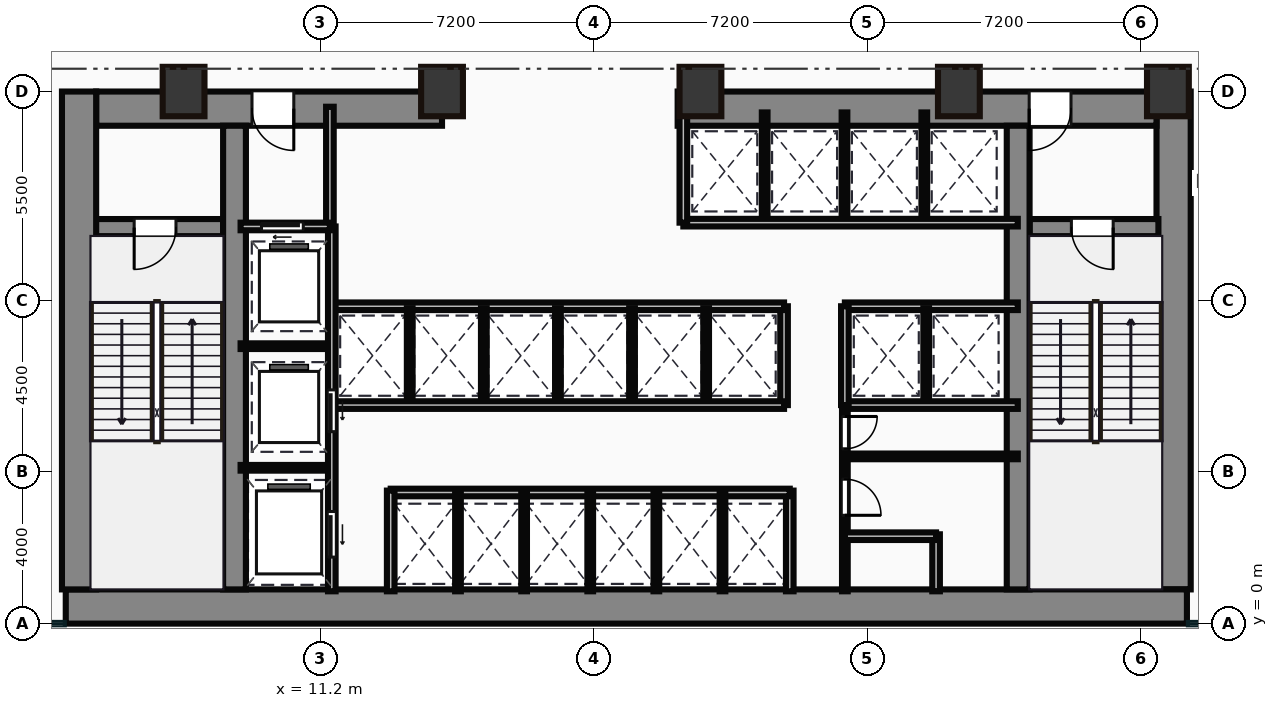
"""IFC4 building model, lengths in metres.
Left out: names, types, materials, properties, quantities, classifications, styles, units other than length and angle.
Written with IfcOpenShell. Run it as: python <this file> out.ifc"""

import sys

from ifc_helpers import new_model, si_unit, direction, frame, frame_2d, origin, origin_2d, place, context, subcontext, project, spatial, rectangle, hollow_rectangle, extrude, source, transform, mapped, element, fill, save


model = new_model("IFC4")
c1 = context("Model", 3, precision=1e-05, world=origin(), true_north=direction((0.0, 1.0)))
c2 = subcontext(c1, "Body", "Model", "MODEL_VIEW")
j1 = project(units=[si_unit("LENGTHUNIT", "METRE"), si_unit("PLANEANGLEUNIT", "RADIAN")], contexts=[c1])
p1 = place(None, origin())
s1 = spatial("IfcSite", under=j1, at=p1, CompositionType="ELEMENT")
p2 = place(p1, origin())
s2 = spatial("IfcBuilding", under=s1, at=p2, CompositionType="ELEMENT")
p3 = place(p2, frame((0.0, 0.0, 16.0)))
s3 = spatial("IfcBuildingStorey", under=s2, at=p3, CompositionType="ELEMENT", Elevation=16.0)
m1 = source(origin(), c2, "Body", "SweptSolid", [
    extrude(rectangle(XDim=29.5, YDim=0.9, at=frame_2d((14.75, 0.0))), origin(), (0.0, 0.0, 1.0), 5.0),
])
p4 = place(p3, frame((4.5, 0.45, 0.0), z_axis=(0.0, 0.0, 1.0), x_axis=(1.0, 0.0, 0.0)))
e1 = element("IfcWall", 1, at=p4, inside=s3, PredefinedType="SHEAR", context=c2, shape_type="MappedRepresentation", body=[
    mapped(m1, transform((0.0, 0.0, 0.0))),
])
m2 = source(origin(), c2, "Body", "SweptSolid", [
    extrude(rectangle(XDim=13.1, YDim=0.9, at=frame_2d((6.55, 0.0))), origin(), (0.0, 0.0, 1.0), 5.0),
])
for number, where, z_axis, x_axis in (
    (2, (4.85, 0.9, 0.0), (0.0, 0.0, 1.0), (0.0, 1.0, 0.0)),
    (3, (33.65, 0.9, 0.0), (0.0, 0.0, 1.0), (0.0, 1.0, 0.0)),
):
    element("IfcWall", number, at=place(p3, frame(where, z_axis=z_axis, x_axis=x_axis)), inside=s3, PredefinedType="SHEAR", context=c2, shape_type="MappedRepresentation", body=[
        mapped(m2, transform((0.0, 0.0, 0.0))),
    ])
m3 = source(origin(), c2, "Body", "SweptSolid", [
    extrude(rectangle(XDim=9.1, YDim=0.9, at=frame_2d((4.55, 0.0))), origin(), (0.0, 0.0, 1.0), 5.0),
])
p5 = place(p3, frame((5.3, 13.55, 0.0), z_axis=(0.0, 0.0, 1.0), x_axis=(1.0, 0.0, 0.0)))
e4 = element("IfcWall", 4, at=p5, inside=s3, PredefinedType="SHEAR", context=c2, shape_type="MappedRepresentation", body=[
    mapped(m3, transform((0.0, 0.0, 0.0))),
])
p6 = place(p5, frame((4.1, 0.0, 0.0)))
e5 = element("IfcOpeningElement", 5, at=p6, cuts=e4, PredefinedType="OPENING", context=c2, shape_type="SweptSolid", body=[
    extrude(rectangle(XDim=1.1, YDim=2.15, at=frame_2d((0.55, 1.075))), frame((0.0, 0.46, 0.0), z_axis=(0.0, -1.0, 0.0), x_axis=(1.0, 0.0, 0.0)), (0.0, 0.0, 1.0), 0.92),
])
m4 = source(origin(), c2, "Body", "SweptSolid", [
    extrude(rectangle(XDim=12.6, YDim=0.9, at=frame_2d((6.3, 0.0))), origin(), (0.0, 0.0, 1.0), 5.0),
])
p7 = place(p3, frame((20.6, 13.55, 0.0), z_axis=(0.0, 0.0, 1.0), x_axis=(1.0, 0.0, 0.0)))
e6 = element("IfcWall", 6, at=p7, inside=s3, PredefinedType="SHEAR", context=c2, shape_type="MappedRepresentation", body=[
    mapped(m4, transform((0.0, 0.0, 0.0))),
])
p8 = place(p7, frame((9.25, 0.0, 0.0)))
e7 = element("IfcOpeningElement", 7, at=p8, cuts=e6, PredefinedType="OPENING", context=c2, shape_type="SweptSolid", body=[
    extrude(rectangle(XDim=1.1, YDim=2.15, at=frame_2d((0.55, 1.075))), frame((0.0, 0.46, 0.0), z_axis=(0.0, -1.0, 0.0), x_axis=(1.0, 0.0, 0.0)), (0.0, 0.0, 1.0), 0.92),
])
m5 = source(origin(), c2, "Body", "SweptSolid", [
    extrude(rectangle(XDim=12.2, YDim=0.6, at=frame_2d((6.1, 0.0))), origin(), (0.0, 0.0, 1.0), 5.0),
])
for number, where, z_axis, x_axis in (
    (8, (8.94, 0.9, 0.0), (0.0, 0.0, 1.0), (0.0, 1.0, 0.0)),
    (9, (29.56, 0.9, 0.0), (0.0, 0.0, 1.0), (0.0, 1.0, 0.0)),
):
    element("IfcWall", number, at=place(p3, frame(where, z_axis=z_axis, x_axis=x_axis)), inside=s3, PredefinedType="SHEAR", context=c2, shape_type="MappedRepresentation", body=[
        mapped(m5, transform((0.0, 0.0, 0.0))),
    ])
m6 = source(origin(), c2, "Body", "SweptSolid", [
    extrude(rectangle(XDim=3.39, YDim=0.45, at=frame_2d((1.695, 0.0))), origin(), (0.0, 0.0, 1.0), 5.0),
])
p9 = place(p3, frame((5.25, 10.42, 0.0), z_axis=(0.0, 0.0, 1.0), x_axis=(1.0, 0.0, 0.0)))
e10 = element("IfcWall", 10, at=p9, inside=s3, PredefinedType="SHEAR", context=c2, shape_type="MappedRepresentation", body=[
    mapped(m6, transform((0.0, 0.0, 0.0))),
])
p10 = place(p9, frame((1.05, 0.0, 0.0)))
e11 = element("IfcOpeningElement", 11, at=p10, cuts=e10, PredefinedType="OPENING", context=c2, shape_type="SweptSolid", body=[
    extrude(rectangle(XDim=1.1, YDim=2.15, at=frame_2d((0.55, 1.075))), frame((0.0, 0.235, 0.0), z_axis=(0.0, -1.0, 0.0), x_axis=(1.0, 0.0, 0.0)), (0.0, 0.0, 1.0), 0.47),
])
p11 = place(p3, frame((29.86, 10.42, 0.0), z_axis=(0.0, 0.0, 1.0), x_axis=(1.0, 0.0, 0.0)))
e12 = element("IfcWall", 12, at=p11, inside=s3, PredefinedType="SHEAR", context=c2, shape_type="MappedRepresentation", body=[
    mapped(m6, transform((0.0, 0.0, 0.0))),
])
p12 = place(p11, frame((1.1, 0.0, 0.0)))
e13 = element("IfcOpeningElement", 13, at=p12, cuts=e12, PredefinedType="OPENING", context=c2, shape_type="SweptSolid", body=[
    extrude(rectangle(XDim=1.1, YDim=2.15, at=frame_2d((0.55, 1.075))), frame((0.0, 0.235, 0.0), z_axis=(0.0, -1.0, 0.0), x_axis=(1.0, 0.0, 0.0)), (0.0, 0.0, 1.0), 0.47),
])
m7 = source(origin(), c2, "Body", "SweptSolid", [
    extrude(hollow_rectangle(XDim=1.1, YDim=1.3, WallThickness=0.055, at=origin_2d()), origin(), (0.0, 0.0, 1.0), 5.0),
])
for number, where, z_axis, x_axis in (
    (14, (7.6, 14.0, 0.0), (0.0, 0.0, 1.0), (1.0, 0.0, 0.0)),
    (15, (14.4, 14.0, 0.0), (0.0, 0.0, 1.0), (1.0, 0.0, 0.0)),
    (16, (21.2, 14.0, 0.0), (0.0, 0.0, 1.0), (1.0, 0.0, 0.0)),
    (17, (28.0, 14.0, 0.0), (0.0, 0.0, 1.0), (1.0, 0.0, 0.0)),
    (18, (33.5, 14.0, 0.0), (0.0, 0.0, 1.0), (1.0, 0.0, 0.0)),
):
    element("IfcColumn", number, at=place(p3, frame(where, z_axis=z_axis, x_axis=x_axis)), inside=s3, PredefinedType="PILASTER", context=c2, shape_type="MappedRepresentation", body=[
        mapped(m7, transform((0.0, 0.0, 0.0))),
    ])
m8 = source(origin(), c2, "Body", "SweptSolid", [
    extrude(rectangle(XDim=3.18, YDim=0.2, at=frame_2d((1.59, 0.0))), origin(), (0.0, 0.0, 1.0), 4.7),
])
p13 = place(p3, frame((11.45, 10.42, 0.0), z_axis=(0.0, 0.0, 1.0), x_axis=(0.0, 1.0, 0.0)))
e19 = element("IfcWall", 19, at=p13, inside=s3, PredefinedType="PARTITIONING", context=c2, shape_type="MappedRepresentation", body=[
    mapped(m8, transform((0.0, 0.0, 0.0))),
])
m9 = source(origin(), c2, "Body", "SweptSolid", [
    extrude(rectangle(XDim=2.35, YDim=0.2, at=frame_2d((1.175, 0.0))), origin(), (0.0, 0.0, 1.0), 4.7),
])
p14 = place(p3, frame((9.1, 10.45, 0.0), z_axis=(0.0, 0.0, 1.0), x_axis=(1.0, 0.0, 0.0)))
e20 = element("IfcWall", 20, at=p14, inside=s3, PredefinedType="PARTITIONING", context=c2, shape_type="MappedRepresentation", body=[
    mapped(m9, transform((0.0, 0.0, 0.0))),
])
p15 = place(p14, frame((0.55, 0.0, 0.0)))
e21 = element("IfcOpeningElement", 21, at=p15, cuts=e20, PredefinedType="OPENING", context=c2, shape_type="SweptSolid", body=[
    extrude(rectangle(XDim=1.1, YDim=2.15, at=frame_2d((0.55, 1.075))), frame((0.0, 0.11, 0.0), z_axis=(0.0, -1.0, 0.0), x_axis=(1.0, 0.0, 0.0)), (0.0, 0.0, 1.0), 0.22),
])
m10 = source(origin(), c2, "Body", "SweptSolid", [
    extrude(rectangle(XDim=9.6, YDim=0.2, at=frame_2d((4.8, 0.0))), origin(), (0.0, 0.0, 1.0), 4.7),
])
p16 = place(p3, frame((11.5, 0.85, 0.0), z_axis=(0.0, 0.0, 1.0), x_axis=(0.0, 1.0, 0.0)))
e22 = element("IfcWall", 22, at=p16, inside=s3, PredefinedType="PARTITIONING", context=c2, shape_type="MappedRepresentation", body=[
    mapped(m10, transform((0.0, 0.0, 0.0))),
])
p17 = place(p16, frame((4.2, 0.0, 0.0)))
e23 = element("IfcOpeningElement", 23, at=p17, cuts=e22, PredefinedType="OPENING", context=c2, shape_type="SweptSolid", body=[
    extrude(rectangle(XDim=1.1, YDim=2.15, at=frame_2d((0.55, 1.075))), frame((0.0, 0.11, 0.0), z_axis=(0.0, -1.0, 0.0), x_axis=(1.0, 0.0, 0.0)), (0.0, 0.0, 1.0), 0.22),
])
p18 = place(p16, frame((0.9, 0.0, 0.0)))
e24 = element("IfcOpeningElement", 24, at=p18, cuts=e22, PredefinedType="OPENING", context=c2, shape_type="SweptSolid", body=[
    extrude(rectangle(XDim=1.2, YDim=2.15, at=frame_2d((0.6, 1.075))), frame((0.0, 0.11, 0.0), z_axis=(0.0, -1.0, 0.0), x_axis=(1.0, 0.0, 0.0)), (0.0, 0.0, 1.0), 0.22),
])
m11 = source(origin(), c2, "Body", "SweptSolid", [
    extrude(rectangle(XDim=2.4, YDim=0.15, at=frame_2d((1.2, 0.0))), origin(), (0.0, 0.0, 1.0), 4.7),
])
for number, where, z_axis, x_axis in (
    (25, (9.1, 4.1, 0.0), (0.0, 0.0, 1.0), (1.0, 0.0, 0.0)),
    (26, (9.1, 7.3, 0.0), (0.0, 0.0, 1.0), (1.0, 0.0, 0.0)),
):
    element("IfcWall", number, at=place(p3, frame(where, z_axis=z_axis, x_axis=x_axis)), inside=s3, PredefinedType="PARTITIONING", context=c2, shape_type="MappedRepresentation", body=[
        mapped(m11, transform((0.0, 0.0, 0.0))),
    ])
m12 = source(origin(), c2, "Body", "SweptSolid", [
    extrude(rectangle(XDim=2.65, YDim=0.2, at=frame_2d((1.325, 0.0))), origin(), (0.0, 0.0, 1.0), 4.7),
])
p19 = place(p3, frame((13.05, 0.85, 0.0), z_axis=(0.0, 0.0, 1.0), x_axis=(0.0, 1.0, 0.0)))
e27 = element("IfcWall", 27, at=p19, inside=s3, PredefinedType="PARTITIONING", context=c2, shape_type="MappedRepresentation", body=[
    mapped(m12, transform((0.0, 0.0, 0.0))),
])
m13 = source(origin(), c2, "Body", "SweptSolid", [
    extrude(rectangle(XDim=10.5, YDim=0.2, at=frame_2d((5.25, 0.0))), origin(), (0.0, 0.0, 1.0), 4.7),
])
p20 = place(p3, frame((13.05, 3.45, 0.0), z_axis=(0.0, 0.0, 1.0), x_axis=(1.0, 0.0, 0.0)))
e28 = element("IfcWall", 28, at=p20, inside=s3, PredefinedType="PARTITIONING", context=c2, shape_type="MappedRepresentation", body=[
    mapped(m13, transform((0.0, 0.0, 0.0))),
])
p21 = place(p3, frame((23.55, 0.85, 0.0), z_axis=(0.0, 0.0, 1.0), x_axis=(0.0, 1.0, 0.0)))
e29 = element("IfcWall", 29, at=p21, inside=s3, PredefinedType="PARTITIONING", context=c2, shape_type="MappedRepresentation", body=[
    mapped(m12, transform((0.0, 0.0, 0.0))),
])
m14 = source(origin(), c2, "Body", "SweptSolid", [
    extrude(rectangle(XDim=2.6, YDim=0.15, at=frame_2d((1.3, 0.0))), origin(), (0.0, 0.0, 1.0), 4.7),
])
for number, where, z_axis, x_axis in (
    (30, (14.82, 0.85, 0.0), (0.0, 0.0, 1.0), (0.0, 1.0, 0.0)),
    (31, (16.56, 0.85, 0.0), (0.0, 0.0, 1.0), (0.0, 1.0, 0.0)),
    (32, (18.3, 0.85, 0.0), (0.0, 0.0, 1.0), (0.0, 1.0, 0.0)),
    (33, (20.04, 0.85, 0.0), (0.0, 0.0, 1.0), (0.0, 1.0, 0.0)),
    (34, (21.78, 0.85, 0.0), (0.0, 0.0, 1.0), (0.0, 1.0, 0.0)),
):
    element("IfcWall", number, at=place(p3, frame(where, z_axis=z_axis, x_axis=x_axis)), inside=s3, PredefinedType="PARTITIONING", context=c2, shape_type="MappedRepresentation", body=[
        mapped(m14, transform((0.0, 0.0, 0.0))),
    ])
m15 = source(origin(), c2, "Body", "SweptSolid", [
    extrude(rectangle(XDim=11.85, YDim=0.2, at=frame_2d((5.925, 0.0))), origin(), (0.0, 0.0, 1.0), 4.7),
])
for number, where, z_axis, x_axis in (
    (35, (11.55, 5.75, 0.0), (0.0, 0.0, 1.0), (1.0, 0.0, 0.0)),
    (36, (11.55, 8.35, 0.0), (0.0, 0.0, 1.0), (1.0, 0.0, 0.0)),
):
    element("IfcWall", number, at=place(p3, frame(where, z_axis=z_axis, x_axis=x_axis)), inside=s3, PredefinedType="PARTITIONING", context=c2, shape_type="MappedRepresentation", body=[
        mapped(m15, transform((0.0, 0.0, 0.0))),
    ])
m16 = source(origin(), c2, "Body", "SweptSolid", [
    extrude(rectangle(XDim=2.6, YDim=0.2, at=frame_2d((1.3, 0.0))), origin(), (0.0, 0.0, 1.0), 4.7),
])
p22 = place(p3, frame((23.4, 5.75, 0.0), z_axis=(0.0, 0.0, 1.0), x_axis=(0.0, 1.0, 0.0)))
e37 = element("IfcWall", 37, at=p22, inside=s3, PredefinedType="PARTITIONING", context=c2, shape_type="MappedRepresentation", body=[
    mapped(m16, transform((0.0, 0.0, 0.0))),
])
m17 = source(origin(), c2, "Body", "SweptSolid", [
    extrude(rectangle(XDim=2.5, YDim=0.15, at=frame_2d((1.25, 0.0))), origin(), (0.0, 0.0, 1.0), 4.7),
])
for number, where, z_axis, x_axis in (
    (38, (13.55, 5.8, 0.0), (0.0, 0.0, 1.0), (0.0, 1.0, 0.0)),
    (39, (15.5, 5.8, 0.0), (0.0, 0.0, 1.0), (0.0, 1.0, 0.0)),
    (40, (17.45, 5.8, 0.0), (0.0, 0.0, 1.0), (0.0, 1.0, 0.0)),
    (41, (19.4, 5.8, 0.0), (0.0, 0.0, 1.0), (0.0, 1.0, 0.0)),
    (42, (21.35, 5.8, 0.0), (0.0, 0.0, 1.0), (0.0, 1.0, 0.0)),
):
    element("IfcWall", number, at=place(p3, frame(where, z_axis=z_axis, x_axis=x_axis)), inside=s3, PredefinedType="PARTITIONING", context=c2, shape_type="MappedRepresentation", body=[
        mapped(m17, transform((0.0, 0.0, 0.0))),
    ])
m18 = source(origin(), c2, "Body", "SweptSolid", [
    extrude(rectangle(XDim=8.8, YDim=0.2, at=frame_2d((4.4, 0.0))), origin(), (0.0, 0.0, 1.0), 4.7),
])
p23 = place(p3, frame((20.75, 10.55, 0.0), z_axis=(0.0, 0.0, 1.0), x_axis=(1.0, 0.0, 0.0)))
e43 = element("IfcWall", 43, at=p23, inside=s3, PredefinedType="PARTITIONING", context=c2, shape_type="MappedRepresentation", body=[
    mapped(m18, transform((0.0, 0.0, 0.0))),
])
m19 = source(origin(), c2, "Body", "SweptSolid", [
    extrude(rectangle(XDim=3.0, YDim=0.2, at=frame_2d((1.5, 0.0))), origin(), (0.0, 0.0, 1.0), 4.7),
])
p24 = place(p3, frame((20.75, 10.55, 0.0), z_axis=(0.0, 0.0, 1.0), x_axis=(0.0, 1.0, 0.0)))
e44 = element("IfcWall", 44, at=p24, inside=s3, PredefinedType="PARTITIONING", context=c2, shape_type="MappedRepresentation", body=[
    mapped(m19, transform((0.0, 0.0, 0.0))),
])
m20 = source(origin(), c2, "Body", "SweptSolid", [
    extrude(rectangle(XDim=2.85, YDim=0.15, at=frame_2d((1.425, 0.0))), origin(), (0.0, 0.0, 1.0), 4.7),
])
for number, where, z_axis, x_axis in (
    (45, (22.89, 10.6, 0.0), (0.0, 0.0, 1.0), (0.0, 1.0, 0.0)),
    (46, (24.99, 10.6, 0.0), (0.0, 0.0, 1.0), (0.0, 1.0, 0.0)),
    (47, (27.09, 10.6, 0.0), (0.0, 0.0, 1.0), (0.0, 1.0, 0.0)),
):
    element("IfcWall", number, at=place(p3, frame(where, z_axis=z_axis, x_axis=x_axis)), inside=s3, PredefinedType="PARTITIONING", context=c2, shape_type="MappedRepresentation", body=[
        mapped(m20, transform((0.0, 0.0, 0.0))),
    ])
m21 = source(origin(), c2, "Body", "SweptSolid", [
    extrude(rectangle(XDim=4.55, YDim=0.2, at=frame_2d((2.275, 0.0))), origin(), (0.0, 0.0, 1.0), 4.7),
])
for number, where, z_axis, x_axis in (
    (48, (25.0, 8.35, 0.0), (0.0, 0.0, 1.0), (1.0, 0.0, 0.0)),
    (49, (25.0, 5.75, 0.0), (0.0, 0.0, 1.0), (1.0, 0.0, 0.0)),
):
    element("IfcWall", number, at=place(p3, frame(where, z_axis=z_axis, x_axis=x_axis)), inside=s3, PredefinedType="PARTITIONING", context=c2, shape_type="MappedRepresentation", body=[
        mapped(m21, transform((0.0, 0.0, 0.0))),
    ])
p25 = place(p3, frame((25.0, 5.75, 0.0), z_axis=(0.0, 0.0, 1.0), x_axis=(0.0, 1.0, 0.0)))
e50 = element("IfcWall", 50, at=p25, inside=s3, PredefinedType="PARTITIONING", context=c2, shape_type="MappedRepresentation", body=[
    mapped(m16, transform((0.0, 0.0, 0.0))),
])
p26 = place(p3, frame((27.14, 5.8, 0.0), z_axis=(0.0, 0.0, 1.0), x_axis=(0.0, 1.0, 0.0)))
e51 = element("IfcWall", 51, at=p26, inside=s3, PredefinedType="PARTITIONING", context=c2, shape_type="MappedRepresentation", body=[
    mapped(m17, transform((0.0, 0.0, 0.0))),
])
m22 = source(origin(), c2, "Body", "SweptSolid", [
    extrude(rectangle(XDim=4.9, YDim=0.15, at=frame_2d((2.45, 0.0))), origin(), (0.0, 0.0, 1.0), 4.7),
])
p27 = place(p3, frame((25.0, 0.85, 0.0), z_axis=(0.0, 0.0, 1.0), x_axis=(0.0, 1.0, 0.0)))
e52 = element("IfcWall", 52, at=p27, inside=s3, PredefinedType="PARTITIONING", context=c2, shape_type="MappedRepresentation", body=[
    mapped(m22, transform((0.0, 0.0, 0.0))),
])
p28 = place(p27, frame((2.0, 0.0, 0.0)))
e53 = element("IfcOpeningElement", 53, at=p28, cuts=e52, PredefinedType="OPENING", context=c2, shape_type="SweptSolid", body=[
    extrude(rectangle(XDim=0.95, YDim=2.15, at=frame_2d((0.475, 1.075))), frame((0.0, 0.085, 0.0), z_axis=(0.0, -1.0, 0.0), x_axis=(1.0, 0.0, 0.0)), (0.0, 0.0, 1.0), 0.17),
])
p29 = place(p27, frame((3.75, 0.0, 0.0)))
e54 = element("IfcOpeningElement", 54, at=p29, cuts=e52, PredefinedType="OPENING", context=c2, shape_type="SweptSolid", body=[
    extrude(rectangle(XDim=0.85, YDim=2.15, at=frame_2d((0.425, 1.075))), frame((0.0, 0.085, 0.0), z_axis=(0.0, -1.0, 0.0), x_axis=(1.0, 0.0, 0.0)), (0.0, 0.0, 1.0), 0.17),
])
m23 = source(origin(), c2, "Body", "SweptSolid", [
    extrude(rectangle(XDim=2.4, YDim=0.2, at=frame_2d((1.2, 0.0))), origin(), (0.0, 0.0, 1.0), 4.7),
])
p30 = place(p3, frame((25.0, 2.3, 0.0), z_axis=(0.0, 0.0, 1.0), x_axis=(1.0, 0.0, 0.0)))
e55 = element("IfcWall", 55, at=p30, inside=s3, PredefinedType="PARTITIONING", context=c2, shape_type="MappedRepresentation", body=[
    mapped(m23, transform((0.0, 0.0, 0.0))),
])
m24 = source(origin(), c2, "Body", "SweptSolid", [
    extrude(rectangle(XDim=1.5, YDim=0.2, at=frame_2d((0.75, 0.0))), origin(), (0.0, 0.0, 1.0), 4.7),
])
p31 = place(p3, frame((27.4, 0.85, 0.0), z_axis=(0.0, 0.0, 1.0), x_axis=(0.0, 1.0, 0.0)))
e56 = element("IfcWall", 56, at=p31, inside=s3, PredefinedType="PARTITIONING", context=c2, shape_type="MappedRepresentation", body=[
    mapped(m24, transform((0.0, 0.0, 0.0))),
])
m25 = source(origin(), c2, "Body", "SweptSolid", [
    extrude(rectangle(XDim=4.55, YDim=0.15, at=frame_2d((2.275, 0.0))), origin(), (0.0, 0.0, 1.0), 4.7),
])
p32 = place(p3, frame((25.0, 4.4, 0.0), z_axis=(0.0, 0.0, 1.0), x_axis=(1.0, 0.0, 0.0)))
e57 = element("IfcWall", 57, at=p32, inside=s3, PredefinedType="PARTITIONING", context=c2, shape_type="MappedRepresentation", body=[
    mapped(m25, transform((0.0, 0.0, 0.0))),
])
m26 = source(origin(), c2, "Body", "SweptSolid", [
    extrude(rectangle(XDim=1.1, YDim=2.15, at=frame_2d((0.55, 1.075))), frame((0.0, 0.025, 0.0), z_axis=(0.0, -1.0, 0.0), x_axis=(1.0, 0.0, 0.0)), (0.0, 0.0, 1.0), 0.05),
])
p33 = place(p10, frame((1.1, 0.0, 0.0), z_axis=(0.0, 0.0, 1.0), x_axis=(-1.0, 0.0, 0.0)))
e58 = element("IfcDoor", 58, at=p33, inside=s3, OperationType="SINGLE_SWING_LEFT", PredefinedType="DOOR", context=c2, shape_type="MappedRepresentation", body=[
    mapped(m26, transform((0.0, 0.0, 0.0))),
])
fill(e11, e58)
p34 = place(p12, frame((1.1, 0.0, 0.0), z_axis=(0.0, 0.0, 1.0), x_axis=(-1.0, 0.0, 0.0)))
e59 = element("IfcDoor", 59, at=p34, inside=s3, OperationType="SINGLE_SWING_RIGHT", PredefinedType="DOOR", context=c2, shape_type="MappedRepresentation", body=[
    mapped(m26, transform((0.0, 0.0, 0.0))),
])
fill(e13, e59)
p35 = place(p6, origin())
e60 = element("IfcDoor", 60, at=p35, inside=s3, OperationType="SINGLE_SWING_RIGHT", PredefinedType="DOOR", context=c2, shape_type="MappedRepresentation", body=[
    mapped(m26, transform((0.0, 0.0, 0.0))),
])
fill(e5, e60)
p36 = place(p8, origin())
e61 = element("IfcDoor", 61, at=p36, inside=s3, OperationType="SINGLE_SWING_LEFT", PredefinedType="DOOR", context=c2, shape_type="MappedRepresentation", body=[
    mapped(m26, transform((0.0, 0.0, 0.0))),
])
fill(e7, e61)
p37 = place(p15, origin())
e62 = element("IfcDoor", 62, at=p37, inside=s3, OperationType="SLIDING_TO_LEFT", PredefinedType="DOOR", context=c2, shape_type="MappedRepresentation", body=[
    mapped(m26, transform((0.0, 0.0, 0.0))),
])
fill(e21, e62)
p38 = place(p17, frame((1.1, 0.0, 0.0), z_axis=(0.0, 0.0, 1.0), x_axis=(-1.0, 0.0, 0.0)))
e63 = element("IfcDoor", 63, at=p38, inside=s3, OperationType="SLIDING_TO_LEFT", PredefinedType="DOOR", context=c2, shape_type="MappedRepresentation", body=[
    mapped(m26, transform((0.0, 0.0, 0.0))),
])
fill(e23, e63)
m27 = source(origin(), c2, "Body", "SweptSolid", [
    extrude(rectangle(XDim=1.2, YDim=2.15, at=frame_2d((0.6, 1.075))), frame((0.0, 0.025, 0.0), z_axis=(0.0, -1.0, 0.0), x_axis=(1.0, 0.0, 0.0)), (0.0, 0.0, 1.0), 0.05),
])
p39 = place(p18, frame((1.2, 0.0, 0.0), z_axis=(0.0, 0.0, 1.0), x_axis=(-1.0, 0.0, 0.0)))
e64 = element("IfcDoor", 64, at=p39, inside=s3, OperationType="SLIDING_TO_LEFT", PredefinedType="DOOR", context=c2, shape_type="MappedRepresentation", body=[
    mapped(m27, transform((0.0, 0.0, 0.0))),
])
fill(e24, e64)
m28 = source(origin(), c2, "Body", "SweptSolid", [
    extrude(rectangle(XDim=0.95, YDim=2.15, at=frame_2d((0.475, 1.075))), frame((0.0, 0.025, 0.0), z_axis=(0.0, -1.0, 0.0), x_axis=(1.0, 0.0, 0.0)), (0.0, 0.0, 1.0), 0.05),
])
p40 = place(p28, origin())
e65 = element("IfcDoor", 65, at=p40, inside=s3, OperationType="SINGLE_SWING_LEFT", PredefinedType="DOOR", context=c2, shape_type="MappedRepresentation", body=[
    mapped(m28, transform((0.0, 0.0, 0.0))),
])
fill(e53, e65)
m29 = source(origin(), c2, "Body", "SweptSolid", [
    extrude(rectangle(XDim=0.85, YDim=2.15, at=frame_2d((0.425, 1.075))), frame((0.0, 0.025, 0.0), z_axis=(0.0, -1.0, 0.0), x_axis=(1.0, 0.0, 0.0)), (0.0, 0.0, 1.0), 0.05),
])
p41 = place(p29, origin())
e66 = element("IfcDoor", 66, at=p41, inside=s3, OperationType="SINGLE_SWING_RIGHT", PredefinedType="DOOR", context=c2, shape_type="MappedRepresentation", body=[
    mapped(m29, transform((0.0, 0.0, 0.0))),
])
fill(e54, e66)
save(model, sys.argv[1])
